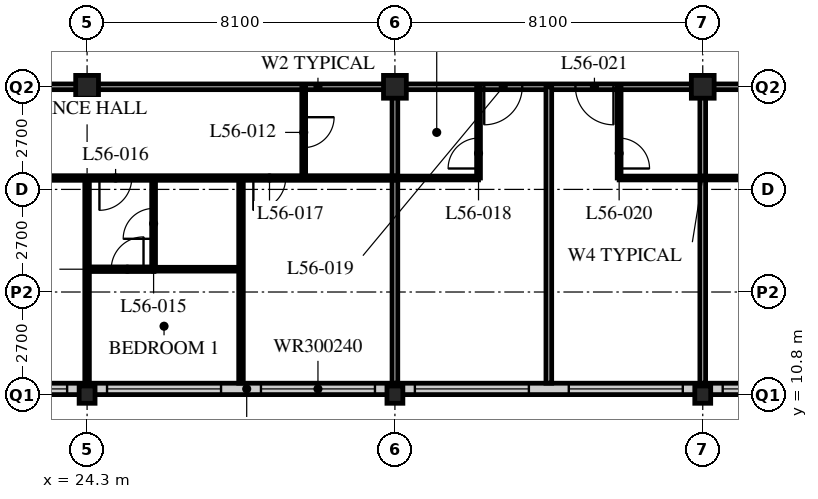
"""IFC4 building model, lengths in metres.
Left out: names, types, materials, properties, quantities, classifications, styles, units other than length and angle.
Written with IfcOpenShell. Run it as: python <this file> out.ifc"""

import sys

from ifc_helpers import new_model, si_unit, direction, frame, frame_2d, origin, origin_2d, place, context, subcontext, project, spatial, rectangle, hollow_rectangle, i_section, extrude, element, fill, save


model = new_model("IFC4")
c1 = context("Model", 3, precision=1e-05, world=origin(), true_north=direction((0.0, 1.0)))
c2 = subcontext(c1, "Body", "Model", "MODEL_VIEW")
j1 = project(units=[si_unit("LENGTHUNIT", "METRE"), si_unit("PLANEANGLEUNIT", "RADIAN")], contexts=[c1])
p1 = place(None, origin())
s1 = spatial("IfcSite", under=j1, at=p1, CompositionType="ELEMENT")
p2 = place(p1, origin())
s2 = spatial("IfcBuilding", under=s1, at=p2, CompositionType="ELEMENT")
p3 = place(p2, frame((0.0, 0.0, 217.2)))
s3 = spatial("IfcBuildingStorey", under=s2, at=p3, CompositionType="ELEMENT", Elevation=217.2)
p4 = place(p3, frame((24.3, 10.8, 0.0), z_axis=(0.0, 0.0, 1.0), x_axis=(1.0, 0.0, 0.0)))
e1 = element("IfcColumn", 1, at=p4, inside=s3, PredefinedType="COLUMN", context=c2, shape_type="SweptSolid", body=[
    extrude(i_section(OverallWidth=0.418, OverallDepth=0.456, WebThickness=0.042, FlangeThickness=0.067, FilletRadius=0.015, at=origin_2d()), origin(), (0.0, 0.0, 1.0), 3.6),
])
p5 = place(p3, frame((24.3, 18.9, 0.0), z_axis=(0.0, 0.0, 1.0), x_axis=(1.0, 0.0, 0.0)))
e2 = element("IfcColumn", 2, at=p5, inside=s3, PredefinedType="COLUMN", context=c2, shape_type="SweptSolid", body=[
    extrude(hollow_rectangle(XDim=0.6, YDim=0.6, WallThickness=0.05, at=origin_2d()), origin(), (0.0, 0.0, 1.0), 3.6),
])
p6 = place(p3, frame((32.4, 10.8, 0.0), z_axis=(0.0, 0.0, 1.0), x_axis=(1.0, 0.0, 0.0)))
e3 = element("IfcColumn", 3, at=p6, inside=s3, PredefinedType="COLUMN", context=c2, shape_type="SweptSolid", body=[
    extrude(i_section(OverallWidth=0.418, OverallDepth=0.456, WebThickness=0.042, FlangeThickness=0.067, FilletRadius=0.015, at=origin_2d()), origin(), (0.0, 0.0, 1.0), 3.6),
])
p7 = place(p3, frame((32.4, 18.9, 0.0), z_axis=(0.0, 0.0, 1.0), x_axis=(1.0, 0.0, 0.0)))
e4 = element("IfcColumn", 4, at=p7, inside=s3, PredefinedType="COLUMN", context=c2, shape_type="SweptSolid", body=[
    extrude(hollow_rectangle(XDim=0.6, YDim=0.6, WallThickness=0.05, at=origin_2d()), origin(), (0.0, 0.0, 1.0), 3.6),
])
p8 = place(p3, frame((40.5, 10.8, 0.0), z_axis=(0.0, 0.0, 1.0), x_axis=(1.0, 0.0, 0.0)))
e5 = element("IfcColumn", 5, at=p8, inside=s3, PredefinedType="COLUMN", context=c2, shape_type="SweptSolid", body=[
    extrude(i_section(OverallWidth=0.418, OverallDepth=0.456, WebThickness=0.042, FlangeThickness=0.067, FilletRadius=0.015, at=origin_2d()), origin(), (0.0, 0.0, 1.0), 3.6),
])
p9 = place(p3, frame((40.5, 18.9, 0.0), z_axis=(0.0, 0.0, 1.0), x_axis=(1.0, 0.0, 0.0)))
e6 = element("IfcColumn", 6, at=p9, inside=s3, PredefinedType="COLUMN", context=c2, shape_type="SweptSolid", body=[
    extrude(hollow_rectangle(XDim=0.6, YDim=0.6, WallThickness=0.05, at=origin_2d()), origin(), (0.0, 0.0, 1.0), 3.6),
])
p10 = place(p3, frame((8.4, 10.95, 0.0), z_axis=(0.0, 0.0, 1.0), x_axis=(1.0, 0.0, 0.0)))
e7 = element("IfcWall", 7, at=p10, inside=s3, PredefinedType="SOLIDWALL", context=c2, shape_type="SweptSolid", body=[
    extrude(rectangle(XDim=40.2, YDim=0.3, at=frame_2d((20.1, 0.0))), origin(), (0.0, 0.0, 1.0), 3.39),
])
p11 = place(p10, frame((0.225, 0.0, 0.6)))
e8 = element("IfcOpeningElement", 8, at=p11, cuts=e7, PredefinedType="OPENING", context=c2, shape_type="SweptSolid", body=[
    extrude(rectangle(XDim=3.0, YDim=2.4, at=frame_2d((1.5, 1.2))), frame((0.0, 0.16, 0.0), z_axis=(0.0, -1.0, 0.0), x_axis=(1.0, 0.0, 0.0)), (0.0, 0.0, 1.0), 0.32),
])
p12 = place(p10, frame((4.275, 0.0, 0.6)))
e9 = element("IfcOpeningElement", 9, at=p12, cuts=e7, PredefinedType="OPENING", context=c2, shape_type="SweptSolid", body=[
    extrude(rectangle(XDim=3.0, YDim=2.4, at=frame_2d((1.5, 1.2))), frame((0.0, 0.16, 0.0), z_axis=(0.0, -1.0, 0.0), x_axis=(1.0, 0.0, 0.0)), (0.0, 0.0, 1.0), 0.32),
])
p13 = place(p10, frame((8.325, 0.0, 0.6)))
e10 = element("IfcOpeningElement", 10, at=p13, cuts=e7, PredefinedType="OPENING", context=c2, shape_type="SweptSolid", body=[
    extrude(rectangle(XDim=3.0, YDim=2.4, at=frame_2d((1.5, 1.2))), frame((0.0, 0.16, 0.0), z_axis=(0.0, -1.0, 0.0), x_axis=(1.0, 0.0, 0.0)), (0.0, 0.0, 1.0), 0.32),
])
p14 = place(p10, frame((12.375, 0.0, 0.6)))
e11 = element("IfcOpeningElement", 11, at=p14, cuts=e7, PredefinedType="OPENING", context=c2, shape_type="SweptSolid", body=[
    extrude(rectangle(XDim=3.0, YDim=2.4, at=frame_2d((1.5, 1.2))), frame((0.0, 0.16, 0.0), z_axis=(0.0, -1.0, 0.0), x_axis=(1.0, 0.0, 0.0)), (0.0, 0.0, 1.0), 0.32),
])
p15 = place(p10, frame((16.425, 0.0, 0.6)))
e12 = element("IfcOpeningElement", 12, at=p15, cuts=e7, PredefinedType="OPENING", context=c2, shape_type="SweptSolid", body=[
    extrude(rectangle(XDim=3.0, YDim=2.4, at=frame_2d((1.5, 1.2))), frame((0.0, 0.16, 0.0), z_axis=(0.0, -1.0, 0.0), x_axis=(1.0, 0.0, 0.0)), (0.0, 0.0, 1.0), 0.32),
])
p16 = place(p10, frame((20.475, 0.0, 0.6)))
e13 = element("IfcOpeningElement", 13, at=p16, cuts=e7, PredefinedType="OPENING", context=c2, shape_type="SweptSolid", body=[
    extrude(rectangle(XDim=3.0, YDim=2.4, at=frame_2d((1.5, 1.2))), frame((0.0, 0.16, 0.0), z_axis=(0.0, -1.0, 0.0), x_axis=(1.0, 0.0, 0.0)), (0.0, 0.0, 1.0), 0.32),
])
p17 = place(p10, frame((24.525, 0.0, 0.6)))
e14 = element("IfcOpeningElement", 14, at=p17, cuts=e7, PredefinedType="OPENING", context=c2, shape_type="SweptSolid", body=[
    extrude(rectangle(XDim=3.0, YDim=2.4, at=frame_2d((1.5, 1.2))), frame((0.0, 0.16, 0.0), z_axis=(0.0, -1.0, 0.0), x_axis=(1.0, 0.0, 0.0)), (0.0, 0.0, 1.0), 0.32),
])
p18 = place(p10, frame((28.575, 0.0, 0.6)))
e15 = element("IfcOpeningElement", 15, at=p18, cuts=e7, PredefinedType="OPENING", context=c2, shape_type="SweptSolid", body=[
    extrude(rectangle(XDim=3.0, YDim=2.4, at=frame_2d((1.5, 1.2))), frame((0.0, 0.16, 0.0), z_axis=(0.0, -1.0, 0.0), x_axis=(1.0, 0.0, 0.0)), (0.0, 0.0, 1.0), 0.32),
])
p19 = place(p10, frame((32.625, 0.0, 0.6)))
e16 = element("IfcOpeningElement", 16, at=p19, cuts=e7, PredefinedType="OPENING", context=c2, shape_type="SweptSolid", body=[
    extrude(rectangle(XDim=3.0, YDim=2.4, at=frame_2d((1.5, 1.2))), frame((0.0, 0.16, 0.0), z_axis=(0.0, -1.0, 0.0), x_axis=(1.0, 0.0, 0.0)), (0.0, 0.0, 1.0), 0.32),
])
p20 = place(p10, frame((36.675, 0.0, 0.6)))
e17 = element("IfcOpeningElement", 17, at=p20, cuts=e7, PredefinedType="OPENING", context=c2, shape_type="SweptSolid", body=[
    extrude(rectangle(XDim=3.0, YDim=2.4, at=frame_2d((1.5, 1.2))), frame((0.0, 0.16, 0.0), z_axis=(0.0, -1.0, 0.0), x_axis=(1.0, 0.0, 0.0)), (0.0, 0.0, 1.0), 0.32),
])
p21 = place(p3, frame((12.15, 18.9, 0.0), z_axis=(0.0, 0.0, 1.0), x_axis=(1.0, 0.0, 0.0)))
e18 = element("IfcWall", 18, at=p21, inside=s3, PredefinedType="PARTITIONING", context=c2, shape_type="SweptSolid", body=[
    extrude(rectangle(XDim=36.45, YDim=0.15, at=frame_2d((18.225, 0.0))), origin(), (0.0, 0.0, 1.0), 2.778),
])
p22 = place(p21, frame((4.95, 0.0, 0.0)))
e19 = element("IfcOpeningElement", 19, at=p22, cuts=e18, PredefinedType="OPENING", context=c2, shape_type="SweptSolid", body=[
    extrude(rectangle(XDim=1.0, YDim=2.1, at=frame_2d((0.5, 1.05))), frame((0.0, 0.085, 0.0), z_axis=(0.0, -1.0, 0.0), x_axis=(1.0, 0.0, 0.0)), (0.0, 0.0, 1.0), 0.17),
])
p23 = place(p21, frame((22.6, 0.0, 0.0)))
e20 = element("IfcOpeningElement", 20, at=p23, cuts=e18, PredefinedType="OPENING", context=c2, shape_type="SweptSolid", body=[
    extrude(rectangle(XDim=1.0, YDim=2.1, at=frame_2d((0.5, 1.05))), frame((0.0, 0.085, 0.0), z_axis=(0.0, -1.0, 0.0), x_axis=(1.0, 0.0, 0.0)), (0.0, 0.0, 1.0), 0.17),
])
p24 = place(p21, frame((25.0, 0.0, 0.0)))
e21 = element("IfcOpeningElement", 21, at=p24, cuts=e18, PredefinedType="OPENING", context=c2, shape_type="SweptSolid", body=[
    extrude(rectangle(XDim=1.0, YDim=2.1, at=frame_2d((0.5, 1.05))), frame((0.0, 0.085, 0.0), z_axis=(0.0, -1.0, 0.0), x_axis=(1.0, 0.0, 0.0)), (0.0, 0.0, 1.0), 0.17),
])
p25 = place(p21, frame((30.7, 0.0, 0.0)))
e22 = element("IfcOpeningElement", 22, at=p25, cuts=e18, PredefinedType="OPENING", context=c2, shape_type="SweptSolid", body=[
    extrude(rectangle(XDim=1.0, YDim=2.1, at=frame_2d((0.5, 1.05))), frame((0.0, 0.085, 0.0), z_axis=(0.0, -1.0, 0.0), x_axis=(1.0, 0.0, 0.0)), (0.0, 0.0, 1.0), 0.17),
])
p26 = place(p21, frame((1.525, 0.0, 0.0)))
e23 = element("IfcOpeningElement", 23, at=p26, cuts=e18, PredefinedType="OPENING", context=c2, shape_type="SweptSolid", body=[
    extrude(rectangle(XDim=1.0, YDim=2.1, at=frame_2d((0.5, 1.05))), frame((0.0, 0.085, 0.0), z_axis=(0.0, -1.0, 0.0), x_axis=(1.0, 0.0, 0.0)), (0.0, 0.0, 1.0), 0.17),
])
p27 = place(p21, frame((32.825, 0.0, 0.0)))
e24 = element("IfcOpeningElement", 24, at=p27, cuts=e18, PredefinedType="OPENING", context=c2, shape_type="SweptSolid", body=[
    extrude(rectangle(XDim=1.0, YDim=2.1, at=frame_2d((0.5, 1.05))), frame((0.0, 0.085, 0.0), z_axis=(0.0, -1.0, 0.0), x_axis=(1.0, 0.0, 0.0)), (0.0, 0.0, 1.0), 0.17),
])
p28 = place(p3, frame((30.0, 18.9, 0.0), z_axis=(0.0, 0.0, 1.0), x_axis=(0.0, -1.0, 0.0)))
e25 = element("IfcWall", 25, at=p28, inside=s3, PredefinedType="PARTITIONING", context=c2, shape_type="SweptSolid", body=[
    extrude(rectangle(XDim=2.4, YDim=0.1, at=frame_2d((1.2, 0.0))), origin(), (0.0, 0.0, 1.0), 3.39),
])
p29 = place(p28, frame((0.8, 0.0, 0.0)))
e26 = element("IfcOpeningElement", 26, at=p29, cuts=e25, PredefinedType="OPENING", context=c2, shape_type="SweptSolid", body=[
    extrude(rectangle(XDim=0.8, YDim=2.1, at=frame_2d((0.4, 1.05))), frame((0.0, 0.06, 0.0), z_axis=(0.0, -1.0, 0.0), x_axis=(1.0, 0.0, 0.0)), (0.0, 0.0, 1.0), 0.12),
])
p30 = place(p3, frame((26.05, 16.5, 0.0), z_axis=(0.0, 0.0, 1.0), x_axis=(0.0, -1.0, 0.0)))
e27 = element("IfcWall", 27, at=p30, inside=s3, PredefinedType="PARTITIONING", context=c2, shape_type="SweptSolid", body=[
    extrude(rectangle(XDim=2.4, YDim=0.1, at=frame_2d((1.2, 0.0))), origin(), (0.0, 0.0, 1.0), 3.39),
])
p31 = place(p30, frame((0.8, 0.0, 0.0)))
e28 = element("IfcOpeningElement", 28, at=p31, cuts=e27, PredefinedType="OPENING", context=c2, shape_type="SweptSolid", body=[
    extrude(rectangle(XDim=0.8, YDim=2.1, at=frame_2d((0.4, 1.05))), frame((0.0, 0.06, 0.0), z_axis=(0.0, -1.0, 0.0), x_axis=(1.0, 0.0, 0.0)), (0.0, 0.0, 1.0), 0.12),
])
p32 = place(p3, frame((26.05, 14.1, 0.0), z_axis=(0.0, 0.0, 1.0), x_axis=(1.0, 0.0, 0.0)))
e29 = element("IfcWall", 29, at=p32, inside=s3, PredefinedType="PARTITIONING", context=c2, shape_type="SweptSolid", body=[
    extrude(rectangle(XDim=2.3, YDim=0.1, at=frame_2d((1.15, 0.0))), origin(), (0.0, 0.0, 1.0), 3.39),
])
p33 = place(p3, frame((24.3, 16.5, 0.0), z_axis=(0.0, 0.0, 1.0), x_axis=(0.0, -1.0, 0.0)))
e30 = element("IfcWall", 30, at=p33, inside=s3, PredefinedType="PARTITIONING", context=c2, shape_type="SweptSolid", body=[
    extrude(rectangle(XDim=5.4, YDim=0.12, at=frame_2d((2.7, 0.0))), origin(), (0.0, 0.0, 1.0), 2.778),
])
p34 = place(p3, frame((28.35, 16.5, 0.0), z_axis=(0.0, 0.0, 1.0), x_axis=(0.0, -1.0, 0.0)))
e31 = element("IfcWall", 31, at=p34, inside=s3, PredefinedType="PARTITIONING", context=c2, shape_type="SweptSolid", body=[
    extrude(rectangle(XDim=5.4, YDim=0.12, at=frame_2d((2.7, 0.0))), origin(), (0.0, 0.0, 1.0), 3.39),
])
p35 = place(p3, frame((32.4, 18.9, 0.0), z_axis=(0.0, 0.0, 1.0), x_axis=(0.0, -1.0, 0.0)))
e32 = element("IfcWall", 32, at=p35, inside=s3, PredefinedType="PARTITIONING", context=c2, shape_type="SweptSolid", body=[
    extrude(rectangle(XDim=7.8, YDim=0.15, at=frame_2d((3.9, 0.0))), origin(), (0.0, 0.0, 1.0), 2.778),
])
p36 = place(p3, frame((32.4, 16.5, 0.0), z_axis=(0.0, 0.0, 1.0), x_axis=(1.0, 0.0, 0.0)))
e33 = element("IfcWall", 33, at=p36, inside=s3, PredefinedType="PARTITIONING", context=c2, shape_type="SweptSolid", body=[
    extrude(rectangle(XDim=2.2, YDim=0.1, at=frame_2d((1.1, 0.0))), origin(), (0.0, 0.0, 1.0), 3.39),
])
p37 = place(p3, frame((34.6, 18.9, 0.0), z_axis=(0.0, 0.0, 1.0), x_axis=(0.0, -1.0, 0.0)))
e34 = element("IfcWall", 34, at=p37, inside=s3, PredefinedType="PARTITIONING", context=c2, shape_type="SweptSolid", body=[
    extrude(rectangle(XDim=2.4, YDim=0.1, at=frame_2d((1.2, 0.0))), origin(), (0.0, 0.0, 1.0), 3.39),
])
p38 = place(p37, frame((1.35, 0.0, 0.0)))
e35 = element("IfcOpeningElement", 35, at=p38, cuts=e34, PredefinedType="OPENING", context=c2, shape_type="SweptSolid", body=[
    extrude(rectangle(XDim=0.8, YDim=2.1, at=frame_2d((0.4, 1.05))), frame((0.0, 0.06, 0.0), z_axis=(0.0, -1.0, 0.0), x_axis=(1.0, 0.0, 0.0)), (0.0, 0.0, 1.0), 0.12),
])
p39 = place(p3, frame((36.45, 18.9, 0.0), z_axis=(0.0, 0.0, 1.0), x_axis=(0.0, -1.0, 0.0)))
e36 = element("IfcWall", 36, at=p39, inside=s3, PredefinedType="PARTITIONING", context=c2, shape_type="SweptSolid", body=[
    extrude(rectangle(XDim=7.8, YDim=0.15, at=frame_2d((3.9, 0.0))), origin(), (0.0, 0.0, 1.0), 3.39),
])
p40 = place(p3, frame((38.3, 16.5, 0.0), z_axis=(0.0, 0.0, 1.0), x_axis=(1.0, 0.0, 0.0)))
e37 = element("IfcWall", 37, at=p40, inside=s3, PredefinedType="PARTITIONING", context=c2, shape_type="SweptSolid", body=[
    extrude(rectangle(XDim=4.4, YDim=0.1, at=frame_2d((2.2, 0.0))), origin(), (0.0, 0.0, 1.0), 3.39),
])
p41 = place(p3, frame((38.3, 18.9, 0.0), z_axis=(0.0, 0.0, 1.0), x_axis=(0.0, -1.0, 0.0)))
e38 = element("IfcWall", 38, at=p41, inside=s3, PredefinedType="PARTITIONING", context=c2, shape_type="SweptSolid", body=[
    extrude(rectangle(XDim=2.4, YDim=0.1, at=frame_2d((1.2, 0.0))), origin(), (0.0, 0.0, 1.0), 3.39),
])
p42 = place(p41, frame((1.35, 0.0, 0.0)))
e39 = element("IfcOpeningElement", 39, at=p42, cuts=e38, PredefinedType="OPENING", context=c2, shape_type="SweptSolid", body=[
    extrude(rectangle(XDim=0.8, YDim=2.1, at=frame_2d((0.4, 1.05))), frame((0.0, 0.06, 0.0), z_axis=(0.0, -1.0, 0.0), x_axis=(1.0, 0.0, 0.0)), (0.0, 0.0, 1.0), 0.12),
])
p43 = place(p3, frame((40.5, 18.9, 0.0), z_axis=(0.0, 0.0, 1.0), x_axis=(0.0, -1.0, 0.0)))
e40 = element("IfcWall", 40, at=p43, inside=s3, PredefinedType="PARTITIONING", context=c2, shape_type="SweptSolid", body=[
    extrude(rectangle(XDim=7.8, YDim=0.15, at=frame_2d((3.9, 0.0))), origin(), (0.0, 0.0, 1.0), 2.778),
])
p44 = place(p3, frame((8.15, 16.5, 0.0), z_axis=(0.0, 0.0, 1.0), x_axis=(1.0, 0.0, 0.0)))
e41 = element("IfcWall", 41, at=p44, inside=s3, PredefinedType="PARTITIONING", context=c2, shape_type="SweptSolid", body=[
    extrude(rectangle(XDim=24.25, YDim=0.12, at=frame_2d((12.125, 0.0))), origin(), (0.0, 0.0, 1.0), 3.39),
])
p45 = place(p44, frame((9.025, 0.0, 0.0)))
e42 = element("IfcOpeningElement", 42, at=p45, cuts=e41, PredefinedType="OPENING", context=c2, shape_type="SweptSolid", body=[
    extrude(rectangle(XDim=0.85, YDim=2.1, at=frame_2d((0.425, 1.05))), frame((0.0, 0.07, 0.0), z_axis=(0.0, -1.0, 0.0), x_axis=(1.0, 0.0, 0.0)), (0.0, 0.0, 1.0), 0.14),
])
p46 = place(p44, frame((16.475, 0.0, 0.0)))
e43 = element("IfcOpeningElement", 43, at=p46, cuts=e41, PredefinedType="OPENING", context=c2, shape_type="SweptSolid", body=[
    extrude(rectangle(XDim=0.85, YDim=2.1, at=frame_2d((0.425, 1.05))), frame((0.0, 0.07, 0.0), z_axis=(0.0, -1.0, 0.0), x_axis=(1.0, 0.0, 0.0)), (0.0, 0.0, 1.0), 0.14),
])
p47 = place(p44, frame((20.525, 0.0, 0.0)))
e44 = element("IfcOpeningElement", 44, at=p47, cuts=e41, PredefinedType="OPENING", context=c2, shape_type="SweptSolid", body=[
    extrude(rectangle(XDim=0.85, YDim=2.1, at=frame_2d((0.425, 1.05))), frame((0.0, 0.07, 0.0), z_axis=(0.0, -1.0, 0.0), x_axis=(1.0, 0.0, 0.0)), (0.0, 0.0, 1.0), 0.14),
])
p48 = place(p44, frame((6.725, 0.0, 0.0)))
e45 = element("IfcOpeningElement", 45, at=p48, cuts=e41, PredefinedType="OPENING", context=c2, shape_type="SweptSolid", body=[
    extrude(rectangle(XDim=0.85, YDim=2.1, at=frame_2d((0.425, 1.05))), frame((0.0, 0.07, 0.0), z_axis=(0.0, -1.0, 0.0), x_axis=(1.0, 0.0, 0.0)), (0.0, 0.0, 1.0), 0.14),
])
p49 = place(p44, frame((2.875, 0.0, 0.0)))
e46 = element("IfcOpeningElement", 46, at=p49, cuts=e41, PredefinedType="OPENING", context=c2, shape_type="SweptSolid", body=[
    extrude(rectangle(XDim=0.85, YDim=2.1, at=frame_2d((0.425, 1.05))), frame((0.0, 0.07, 0.0), z_axis=(0.0, -1.0, 0.0), x_axis=(1.0, 0.0, 0.0)), (0.0, 0.0, 1.0), 0.14),
])
p50 = place(p3, frame((26.06, 14.1, 0.0), z_axis=(0.0, 0.0, 1.0), x_axis=(-1.0, 0.0, 0.0)))
e47 = element("IfcWall", 47, at=p50, inside=s3, PredefinedType="PARTITIONING", context=c2, shape_type="SweptSolid", body=[
    extrude(rectangle(XDim=1.76, YDim=0.12, at=frame_2d((0.88, 0.0))), origin(), (0.0, 0.0, 1.0), 3.39),
])
p51 = place(p50, frame((0.275, 0.0, 0.0)))
e48 = element("IfcOpeningElement", 48, at=p51, cuts=e47, PredefinedType="OPENING", context=c2, shape_type="SweptSolid", body=[
    extrude(rectangle(XDim=0.85, YDim=2.1, at=frame_2d((0.425, 1.05))), frame((0.0, 0.07, 0.0), z_axis=(0.0, -1.0, 0.0), x_axis=(1.0, 0.0, 0.0)), (0.0, 0.0, 1.0), 0.14),
])
p52 = place(p14, origin())
e49 = element("IfcWindow", 49, at=p52, inside=s3, PartitioningType="SINGLE_PANEL", PredefinedType="WINDOW", context=c2, shape_type="SweptSolid", body=[
    extrude(rectangle(XDim=3.0, YDim=2.4, at=frame_2d((1.5, 1.2))), frame((0.0, 0.03, 0.0), z_axis=(0.0, -1.0, 0.0), x_axis=(1.0, 0.0, 0.0)), (0.0, 0.0, 1.0), 0.06),
])
fill(e11, e49)
p53 = place(p15, origin())
e50 = element("IfcWindow", 50, at=p53, inside=s3, PartitioningType="SINGLE_PANEL", PredefinedType="WINDOW", context=c2, shape_type="SweptSolid", body=[
    extrude(rectangle(XDim=3.0, YDim=2.4, at=frame_2d((1.5, 1.2))), frame((0.0, 0.03, 0.0), z_axis=(0.0, -1.0, 0.0), x_axis=(1.0, 0.0, 0.0)), (0.0, 0.0, 1.0), 0.06),
])
fill(e12, e50)
p54 = place(p16, origin())
e51 = element("IfcWindow", 51, at=p54, inside=s3, PartitioningType="SINGLE_PANEL", PredefinedType="WINDOW", context=c2, shape_type="SweptSolid", body=[
    extrude(rectangle(XDim=3.0, YDim=2.4, at=frame_2d((1.5, 1.2))), frame((0.0, 0.03, 0.0), z_axis=(0.0, -1.0, 0.0), x_axis=(1.0, 0.0, 0.0)), (0.0, 0.0, 1.0), 0.06),
])
fill(e13, e51)
p55 = place(p17, origin())
e52 = element("IfcWindow", 52, at=p55, inside=s3, PartitioningType="SINGLE_PANEL", PredefinedType="WINDOW", context=c2, shape_type="SweptSolid", body=[
    extrude(rectangle(XDim=3.0, YDim=2.4, at=frame_2d((1.5, 1.2))), frame((0.0, 0.03, 0.0), z_axis=(0.0, -1.0, 0.0), x_axis=(1.0, 0.0, 0.0)), (0.0, 0.0, 1.0), 0.06),
])
fill(e14, e52)
p56 = place(p18, origin())
e53 = element("IfcWindow", 53, at=p56, inside=s3, PartitioningType="SINGLE_PANEL", PredefinedType="WINDOW", context=c2, shape_type="SweptSolid", body=[
    extrude(rectangle(XDim=3.0, YDim=2.4, at=frame_2d((1.5, 1.2))), frame((0.0, 0.03, 0.0), z_axis=(0.0, -1.0, 0.0), x_axis=(1.0, 0.0, 0.0)), (0.0, 0.0, 1.0), 0.06),
])
fill(e15, e53)
p57 = place(p19, origin())
e54 = element("IfcWindow", 54, at=p57, inside=s3, PartitioningType="SINGLE_PANEL", PredefinedType="WINDOW", context=c2, shape_type="SweptSolid", body=[
    extrude(rectangle(XDim=3.0, YDim=2.4, at=frame_2d((1.5, 1.2))), frame((0.0, 0.03, 0.0), z_axis=(0.0, -1.0, 0.0), x_axis=(1.0, 0.0, 0.0)), (0.0, 0.0, 1.0), 0.06),
])
fill(e16, e54)
p58 = place(p29, origin())
e55 = element("IfcDoor", 55, at=p58, inside=s3, OperationType="SINGLE_SWING_LEFT", PredefinedType="DOOR", context=c2, shape_type="SweptSolid", body=[
    extrude(rectangle(XDim=0.8, YDim=2.1, at=frame_2d((0.4, 1.05))), frame((0.0, 0.025, 0.0), z_axis=(0.0, -1.0, 0.0), x_axis=(1.0, 0.0, 0.0)), (0.0, 0.0, 1.0), 0.05),
])
fill(e26, e55)
p59 = place(p31, origin())
e56 = element("IfcDoor", 56, at=p59, inside=s3, OperationType="SINGLE_SWING_LEFT", PredefinedType="DOOR", context=c2, shape_type="SweptSolid", body=[
    extrude(rectangle(XDim=0.8, YDim=2.1, at=frame_2d((0.4, 1.05))), frame((0.0, 0.025, 0.0), z_axis=(0.0, -1.0, 0.0), x_axis=(1.0, 0.0, 0.0)), (0.0, 0.0, 1.0), 0.05),
])
fill(e28, e56)
p60 = place(p46, origin())
e57 = element("IfcDoor", 57, at=p60, inside=s3, OperationType="SINGLE_SWING_RIGHT", PredefinedType="DOOR", context=c2, shape_type="SweptSolid", body=[
    extrude(rectangle(XDim=0.85, YDim=2.1, at=frame_2d((0.425, 1.05))), frame((0.0, 0.025, 0.0), z_axis=(0.0, -1.0, 0.0), x_axis=(1.0, 0.0, 0.0)), (0.0, 0.0, 1.0), 0.05),
])
fill(e43, e57)
p61 = place(p47, origin())
e58 = element("IfcDoor", 58, at=p61, inside=s3, OperationType="SINGLE_SWING_RIGHT", PredefinedType="DOOR", context=c2, shape_type="SweptSolid", body=[
    extrude(rectangle(XDim=0.85, YDim=2.1, at=frame_2d((0.425, 1.05))), frame((0.0, 0.025, 0.0), z_axis=(0.0, -1.0, 0.0), x_axis=(1.0, 0.0, 0.0)), (0.0, 0.0, 1.0), 0.05),
])
fill(e44, e58)
p62 = place(p38, origin())
e59 = element("IfcDoor", 59, at=p62, inside=s3, OperationType="SINGLE_SWING_LEFT", PredefinedType="DOOR", context=c2, shape_type="SweptSolid", body=[
    extrude(rectangle(XDim=0.8, YDim=2.1, at=frame_2d((0.4, 1.05))), frame((0.0, 0.025, 0.0), z_axis=(0.0, -1.0, 0.0), x_axis=(1.0, 0.0, 0.0)), (0.0, 0.0, 1.0), 0.05),
])
fill(e35, e59)
p63 = place(p23, origin())
e60 = element("IfcDoor", 60, at=p63, inside=s3, OperationType="SINGLE_SWING_RIGHT", PredefinedType="DOOR", context=c2, shape_type="SweptSolid", body=[
    extrude(rectangle(XDim=1.0, YDim=2.1, at=frame_2d((0.5, 1.05))), frame((0.0, 0.025, 0.0), z_axis=(0.0, -1.0, 0.0), x_axis=(1.0, 0.0, 0.0)), (0.0, 0.0, 1.0), 0.05),
])
fill(e20, e60)
p64 = place(p42, origin())
e61 = element("IfcDoor", 61, at=p64, inside=s3, OperationType="SINGLE_SWING_RIGHT", PredefinedType="DOOR", context=c2, shape_type="SweptSolid", body=[
    extrude(rectangle(XDim=0.8, YDim=2.1, at=frame_2d((0.4, 1.05))), frame((0.0, 0.025, 0.0), z_axis=(0.0, -1.0, 0.0), x_axis=(1.0, 0.0, 0.0)), (0.0, 0.0, 1.0), 0.05),
])
fill(e39, e61)
p65 = place(p24, origin())
e62 = element("IfcDoor", 62, at=p65, inside=s3, OperationType="SINGLE_SWING_LEFT", PredefinedType="DOOR", context=c2, shape_type="SweptSolid", body=[
    extrude(rectangle(XDim=1.0, YDim=2.1, at=frame_2d((0.5, 1.05))), frame((0.0, 0.025, 0.0), z_axis=(0.0, -1.0, 0.0), x_axis=(1.0, 0.0, 0.0)), (0.0, 0.0, 1.0), 0.05),
])
fill(e21, e62)
p66 = place(p51, origin())
e63 = element("IfcDoor", 63, at=p66, inside=s3, OperationType="SINGLE_SWING_RIGHT", PredefinedType="DOOR", context=c2, shape_type="SweptSolid", body=[
    extrude(rectangle(XDim=0.85, YDim=2.1, at=frame_2d((0.425, 1.05))), frame((0.0, 0.025, 0.0), z_axis=(0.0, -1.0, 0.0), x_axis=(1.0, 0.0, 0.0)), (0.0, 0.0, 1.0), 0.05),
])
fill(e48, e63)
save(model, sys.argv[1])
